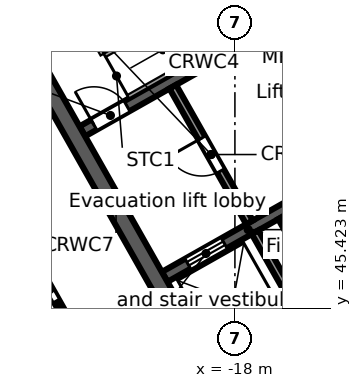
"""IFC4 building model, lengths in metres.
Left out: names, types, materials, properties, quantities, classifications, styles, units other than length and angle.
Written with IfcOpenShell. Run it as: python <this file> out.ifc"""

import sys

from ifc_helpers import new_model, si_unit, direction, frame, frame_2d, origin, place, context, subcontext, project, spatial, rectangle, extrude, element, fill, save


model = new_model("IFC4")
c1 = context("Model", 3, precision=1e-05, world=origin(), true_north=direction((0.0, 1.0)))
c2 = subcontext(c1, "Body", "Model", "MODEL_VIEW")
j1 = project(units=[si_unit("LENGTHUNIT", "METRE"), si_unit("PLANEANGLEUNIT", "RADIAN")], contexts=[c1])
p1 = place(None, origin())
s1 = spatial("IfcSite", under=j1, at=p1, CompositionType="ELEMENT")
p2 = place(p1, origin())
s2 = spatial("IfcBuilding", under=s1, at=p2, CompositionType="ELEMENT")
p3 = place(p2, frame((0.0, 0.0, 207.5)))
s3 = spatial("IfcBuildingStorey", under=s2, at=p3, CompositionType="ELEMENT", Elevation=207.5)
p4 = place(p3, frame((-0.046, 47.974, 0.0), z_axis=(0.0, 0.0, 1.0), x_axis=(-0.870356579543, -0.492421998337, 0.0)))
e1 = element("IfcWall", 1, at=p4, inside=s3, PredefinedType="STANDARD", context=c2, shape_type="SweptSolid", body=[
    extrude(rectangle(XDim=43.754, YDim=0.25, at=frame_2d((21.877, 0.0))), origin(), (0.0, 0.0, 1.0), 3.62),
])
p5 = place(p4, frame((41.061, 0.0, 0.8)))
e2 = element("IfcOpeningElement", 2, at=p5, cuts=e1, PredefinedType="OPENING", context=c2, shape_type="SweptSolid", body=[
    extrude(rectangle(XDim=2.4, YDim=2.2, at=frame_2d((1.2, 1.1))), frame((0.0, 0.135, 0.0), z_axis=(0.0, -1.0, 0.0), x_axis=(1.0, 0.0, 0.0)), (0.0, 0.0, 1.0), 0.27),
])
p6 = place(p4, frame((38.443, 0.0, 0.0)))
e3 = element("IfcOpeningElement", 3, at=p6, cuts=e1, PredefinedType="OPENING", context=c2, shape_type="SweptSolid", body=[
    extrude(rectangle(XDim=1.8, YDim=2.4, at=frame_2d((0.9, 1.2))), frame((0.0, 0.135, 0.0), z_axis=(0.0, -1.0, 0.0), x_axis=(1.0, 0.0, 0.0)), (0.0, 0.0, 1.0), 0.27),
])
p7 = place(p4, frame((35.225, 0.0, 0.8)))
e4 = element("IfcOpeningElement", 4, at=p7, cuts=e1, PredefinedType="OPENING", context=c2, shape_type="SweptSolid", body=[
    extrude(rectangle(XDim=2.4, YDim=2.2, at=frame_2d((1.2, 1.1))), frame((0.0, 0.135, 0.0), z_axis=(0.0, -1.0, 0.0), x_axis=(1.0, 0.0, 0.0)), (0.0, 0.0, 1.0), 0.27),
])
p8 = place(p4, frame((32.307, 0.0, 0.8)))
e5 = element("IfcOpeningElement", 5, at=p8, cuts=e1, PredefinedType="OPENING", context=c2, shape_type="SweptSolid", body=[
    extrude(rectangle(XDim=2.4, YDim=2.2, at=frame_2d((1.2, 1.1))), frame((0.0, 0.135, 0.0), z_axis=(0.0, -1.0, 0.0), x_axis=(1.0, 0.0, 0.0)), (0.0, 0.0, 1.0), 0.27),
])
p9 = place(p4, frame((29.688, 0.0, 0.0)))
e6 = element("IfcOpeningElement", 6, at=p9, cuts=e1, PredefinedType="OPENING", context=c2, shape_type="SweptSolid", body=[
    extrude(rectangle(XDim=1.8, YDim=2.4, at=frame_2d((0.9, 1.2))), frame((0.0, 0.135, 0.0), z_axis=(0.0, -1.0, 0.0), x_axis=(1.0, 0.0, 0.0)), (0.0, 0.0, 1.0), 0.27),
])
p10 = place(p4, frame((26.47, 0.0, 0.8)))
e7 = element("IfcOpeningElement", 7, at=p10, cuts=e1, PredefinedType="OPENING", context=c2, shape_type="SweptSolid", body=[
    extrude(rectangle(XDim=2.4, YDim=2.2, at=frame_2d((1.2, 1.1))), frame((0.0, 0.135, 0.0), z_axis=(0.0, -1.0, 0.0), x_axis=(1.0, 0.0, 0.0)), (0.0, 0.0, 1.0), 0.27),
])
p11 = place(p4, frame((23.552, 0.0, 0.8)))
e8 = element("IfcOpeningElement", 8, at=p11, cuts=e1, PredefinedType="OPENING", context=c2, shape_type="SweptSolid", body=[
    extrude(rectangle(XDim=2.4, YDim=2.2, at=frame_2d((1.2, 1.1))), frame((0.0, 0.135, 0.0), z_axis=(0.0, -1.0, 0.0), x_axis=(1.0, 0.0, 0.0)), (0.0, 0.0, 1.0), 0.27),
])
p12 = place(p4, frame((20.934, 0.0, 0.0)))
e9 = element("IfcOpeningElement", 9, at=p12, cuts=e1, PredefinedType="OPENING", context=c2, shape_type="SweptSolid", body=[
    extrude(rectangle(XDim=1.8, YDim=2.4, at=frame_2d((0.9, 1.2))), frame((0.0, 0.135, 0.0), z_axis=(0.0, -1.0, 0.0), x_axis=(1.0, 0.0, 0.0)), (0.0, 0.0, 1.0), 0.27),
])
p13 = place(p4, frame((17.716, 0.0, 0.8)))
e10 = element("IfcOpeningElement", 10, at=p13, cuts=e1, PredefinedType="OPENING", context=c2, shape_type="SweptSolid", body=[
    extrude(rectangle(XDim=2.4, YDim=2.2, at=frame_2d((1.2, 1.1))), frame((0.0, 0.135, 0.0), z_axis=(0.0, -1.0, 0.0), x_axis=(1.0, 0.0, 0.0)), (0.0, 0.0, 1.0), 0.27),
])
p14 = place(p4, frame((14.798, 0.0, 0.8)))
e11 = element("IfcOpeningElement", 11, at=p14, cuts=e1, PredefinedType="OPENING", context=c2, shape_type="SweptSolid", body=[
    extrude(rectangle(XDim=2.4, YDim=2.2, at=frame_2d((1.2, 1.1))), frame((0.0, 0.135, 0.0), z_axis=(0.0, -1.0, 0.0), x_axis=(1.0, 0.0, 0.0)), (0.0, 0.0, 1.0), 0.27),
])
p15 = place(p4, frame((12.179, 0.0, 0.0)))
e12 = element("IfcOpeningElement", 12, at=p15, cuts=e1, PredefinedType="OPENING", context=c2, shape_type="SweptSolid", body=[
    extrude(rectangle(XDim=1.8, YDim=2.4, at=frame_2d((0.9, 1.2))), frame((0.0, 0.135, 0.0), z_axis=(0.0, -1.0, 0.0), x_axis=(1.0, 0.0, 0.0)), (0.0, 0.0, 1.0), 0.27),
])
p16 = place(p4, frame((8.961, 0.0, 0.8)))
e13 = element("IfcOpeningElement", 13, at=p16, cuts=e1, PredefinedType="OPENING", context=c2, shape_type="SweptSolid", body=[
    extrude(rectangle(XDim=2.4, YDim=2.2, at=frame_2d((1.2, 1.1))), frame((0.0, 0.135, 0.0), z_axis=(0.0, -1.0, 0.0), x_axis=(1.0, 0.0, 0.0)), (0.0, 0.0, 1.0), 0.27),
])
p17 = place(p4, frame((6.043, 0.0, 0.8)))
e14 = element("IfcOpeningElement", 14, at=p17, cuts=e1, PredefinedType="OPENING", context=c2, shape_type="SweptSolid", body=[
    extrude(rectangle(XDim=2.4, YDim=2.2, at=frame_2d((1.2, 1.1))), frame((0.0, 0.135, 0.0), z_axis=(0.0, -1.0, 0.0), x_axis=(1.0, 0.0, 0.0)), (0.0, 0.0, 1.0), 0.27),
])
p18 = place(p4, frame((3.425, 0.0, 0.0)))
e15 = element("IfcOpeningElement", 15, at=p18, cuts=e1, PredefinedType="OPENING", context=c2, shape_type="SweptSolid", body=[
    extrude(rectangle(XDim=1.8, YDim=2.4, at=frame_2d((0.9, 1.2))), frame((0.0, 0.135, 0.0), z_axis=(0.0, -1.0, 0.0), x_axis=(1.0, 0.0, 0.0)), (0.0, 0.0, 1.0), 0.27),
])
p19 = place(p4, frame((0.207, 0.0, 0.8)))
e16 = element("IfcOpeningElement", 16, at=p19, cuts=e1, PredefinedType="OPENING", context=c2, shape_type="SweptSolid", body=[
    extrude(rectangle(XDim=2.4, YDim=2.2, at=frame_2d((1.2, 1.1))), frame((0.0, 0.135, 0.0), z_axis=(0.0, -1.0, 0.0), x_axis=(1.0, 0.0, 0.0)), (0.0, 0.0, 1.0), 0.27),
])
p20 = place(p3, frame((-58.732, 38.771, 0.0), z_axis=(0.0, 0.0, 1.0), x_axis=(0.870354824205, 0.492425100887, 0.0)))
e17 = element("IfcWall", 17, at=p20, inside=s3, PredefinedType="STANDARD", context=c2, shape_type="SweptSolid", body=[
    extrude(rectangle(XDim=64.006, YDim=0.25, at=frame_2d((32.003, 0.0))), origin(), (0.0, 0.0, 1.0), 3.62),
])
p21 = place(p20, frame((61.259, 0.0, 0.8)))
e18 = element("IfcOpeningElement", 18, at=p21, cuts=e17, PredefinedType="OPENING", context=c2, shape_type="SweptSolid", body=[
    extrude(rectangle(XDim=2.4, YDim=2.2, at=frame_2d((1.2, 1.1))), frame((0.0, 0.135, 0.0), z_axis=(0.0, -1.0, 0.0), x_axis=(1.0, 0.0, 0.0)), (0.0, 0.0, 1.0), 0.27),
])
p22 = place(p20, frame((58.216, 0.0, 0.8)))
e19 = element("IfcOpeningElement", 19, at=p22, cuts=e17, PredefinedType="OPENING", context=c2, shape_type="SweptSolid", body=[
    extrude(rectangle(XDim=2.4, YDim=2.2, at=frame_2d((1.2, 1.1))), frame((0.0, 0.135, 0.0), z_axis=(0.0, -1.0, 0.0), x_axis=(1.0, 0.0, 0.0)), (0.0, 0.0, 1.0), 0.27),
])
p23 = place(p20, frame((55.173, 0.0, 0.8)))
e20 = element("IfcOpeningElement", 20, at=p23, cuts=e17, PredefinedType="OPENING", context=c2, shape_type="SweptSolid", body=[
    extrude(rectangle(XDim=2.4, YDim=2.2, at=frame_2d((1.2, 1.1))), frame((0.0, 0.135, 0.0), z_axis=(0.0, -1.0, 0.0), x_axis=(1.0, 0.0, 0.0)), (0.0, 0.0, 1.0), 0.27),
])
p24 = place(p20, frame((52.129, 0.0, 0.8)))
e21 = element("IfcOpeningElement", 21, at=p24, cuts=e17, PredefinedType="OPENING", context=c2, shape_type="SweptSolid", body=[
    extrude(rectangle(XDim=2.4, YDim=2.2, at=frame_2d((1.2, 1.1))), frame((0.0, 0.135, 0.0), z_axis=(0.0, -1.0, 0.0), x_axis=(1.0, 0.0, 0.0)), (0.0, 0.0, 1.0), 0.27),
])
p25 = place(p20, frame((49.086, 0.0, 0.8)))
e22 = element("IfcOpeningElement", 22, at=p25, cuts=e17, PredefinedType="OPENING", context=c2, shape_type="SweptSolid", body=[
    extrude(rectangle(XDim=2.4, YDim=2.2, at=frame_2d((1.2, 1.1))), frame((0.0, 0.135, 0.0), z_axis=(0.0, -1.0, 0.0), x_axis=(1.0, 0.0, 0.0)), (0.0, 0.0, 1.0), 0.27),
])
p26 = place(p20, frame((46.043, 0.0, 0.8)))
e23 = element("IfcOpeningElement", 23, at=p26, cuts=e17, PredefinedType="OPENING", context=c2, shape_type="SweptSolid", body=[
    extrude(rectangle(XDim=2.4, YDim=2.2, at=frame_2d((1.2, 1.1))), frame((0.0, 0.135, 0.0), z_axis=(0.0, -1.0, 0.0), x_axis=(1.0, 0.0, 0.0)), (0.0, 0.0, 1.0), 0.27),
])
p27 = place(p20, frame((43.0, 0.0, 0.8)))
e24 = element("IfcOpeningElement", 24, at=p27, cuts=e17, PredefinedType="OPENING", context=c2, shape_type="SweptSolid", body=[
    extrude(rectangle(XDim=2.4, YDim=2.2, at=frame_2d((1.2, 1.1))), frame((0.0, 0.135, 0.0), z_axis=(0.0, -1.0, 0.0), x_axis=(1.0, 0.0, 0.0)), (0.0, 0.0, 1.0), 0.27),
])
p28 = place(p20, frame((39.956, 0.0, 0.8)))
e25 = element("IfcOpeningElement", 25, at=p28, cuts=e17, PredefinedType="OPENING", context=c2, shape_type="SweptSolid", body=[
    extrude(rectangle(XDim=2.4, YDim=2.2, at=frame_2d((1.2, 1.1))), frame((0.0, 0.135, 0.0), z_axis=(0.0, -1.0, 0.0), x_axis=(1.0, 0.0, 0.0)), (0.0, 0.0, 1.0), 0.27),
])
p29 = place(p20, frame((36.913, 0.0, 0.8)))
e26 = element("IfcOpeningElement", 26, at=p29, cuts=e17, PredefinedType="OPENING", context=c2, shape_type="SweptSolid", body=[
    extrude(rectangle(XDim=2.4, YDim=2.2, at=frame_2d((1.2, 1.1))), frame((0.0, 0.135, 0.0), z_axis=(0.0, -1.0, 0.0), x_axis=(1.0, 0.0, 0.0)), (0.0, 0.0, 1.0), 0.27),
])
p30 = place(p20, frame((33.87, 0.0, 0.8)))
e27 = element("IfcOpeningElement", 27, at=p30, cuts=e17, PredefinedType="OPENING", context=c2, shape_type="SweptSolid", body=[
    extrude(rectangle(XDim=2.4, YDim=2.2, at=frame_2d((1.2, 1.1))), frame((0.0, 0.135, 0.0), z_axis=(0.0, -1.0, 0.0), x_axis=(1.0, 0.0, 0.0)), (0.0, 0.0, 1.0), 0.27),
])
p31 = place(p20, frame((30.826, 0.0, 0.8)))
e28 = element("IfcOpeningElement", 28, at=p31, cuts=e17, PredefinedType="OPENING", context=c2, shape_type="SweptSolid", body=[
    extrude(rectangle(XDim=2.4, YDim=2.2, at=frame_2d((1.2, 1.1))), frame((0.0, 0.135, 0.0), z_axis=(0.0, -1.0, 0.0), x_axis=(1.0, 0.0, 0.0)), (0.0, 0.0, 1.0), 0.27),
])
p32 = place(p20, frame((27.783, 0.0, 0.8)))
e29 = element("IfcOpeningElement", 29, at=p32, cuts=e17, PredefinedType="OPENING", context=c2, shape_type="SweptSolid", body=[
    extrude(rectangle(XDim=2.4, YDim=2.2, at=frame_2d((1.2, 1.1))), frame((0.0, 0.135, 0.0), z_axis=(0.0, -1.0, 0.0), x_axis=(1.0, 0.0, 0.0)), (0.0, 0.0, 1.0), 0.27),
])
p33 = place(p20, frame((24.74, 0.0, 0.8)))
e30 = element("IfcOpeningElement", 30, at=p33, cuts=e17, PredefinedType="OPENING", context=c2, shape_type="SweptSolid", body=[
    extrude(rectangle(XDim=2.4, YDim=2.2, at=frame_2d((1.2, 1.1))), frame((0.0, 0.135, 0.0), z_axis=(0.0, -1.0, 0.0), x_axis=(1.0, 0.0, 0.0)), (0.0, 0.0, 1.0), 0.27),
])
p34 = place(p20, frame((21.696, 0.0, 0.8)))
e31 = element("IfcOpeningElement", 31, at=p34, cuts=e17, PredefinedType="OPENING", context=c2, shape_type="SweptSolid", body=[
    extrude(rectangle(XDim=2.4, YDim=2.2, at=frame_2d((1.2, 1.1))), frame((0.0, 0.135, 0.0), z_axis=(0.0, -1.0, 0.0), x_axis=(1.0, 0.0, 0.0)), (0.0, 0.0, 1.0), 0.27),
])
p35 = place(p20, frame((18.653, 0.0, 0.8)))
e32 = element("IfcOpeningElement", 32, at=p35, cuts=e17, PredefinedType="OPENING", context=c2, shape_type="SweptSolid", body=[
    extrude(rectangle(XDim=2.4, YDim=2.2, at=frame_2d((1.2, 1.1))), frame((0.0, 0.135, 0.0), z_axis=(0.0, -1.0, 0.0), x_axis=(1.0, 0.0, 0.0)), (0.0, 0.0, 1.0), 0.27),
])
p36 = place(p20, frame((15.61, 0.0, 0.8)))
e33 = element("IfcOpeningElement", 33, at=p36, cuts=e17, PredefinedType="OPENING", context=c2, shape_type="SweptSolid", body=[
    extrude(rectangle(XDim=2.4, YDim=2.2, at=frame_2d((1.2, 1.1))), frame((0.0, 0.135, 0.0), z_axis=(0.0, -1.0, 0.0), x_axis=(1.0, 0.0, 0.0)), (0.0, 0.0, 1.0), 0.27),
])
p37 = place(p20, frame((12.567, 0.0, 0.8)))
e34 = element("IfcOpeningElement", 34, at=p37, cuts=e17, PredefinedType="OPENING", context=c2, shape_type="SweptSolid", body=[
    extrude(rectangle(XDim=2.4, YDim=2.2, at=frame_2d((1.2, 1.1))), frame((0.0, 0.135, 0.0), z_axis=(0.0, -1.0, 0.0), x_axis=(1.0, 0.0, 0.0)), (0.0, 0.0, 1.0), 0.27),
])
p38 = place(p20, frame((9.523, 0.0, 0.8)))
e35 = element("IfcOpeningElement", 35, at=p38, cuts=e17, PredefinedType="OPENING", context=c2, shape_type="SweptSolid", body=[
    extrude(rectangle(XDim=2.4, YDim=2.2, at=frame_2d((1.2, 1.1))), frame((0.0, 0.135, 0.0), z_axis=(0.0, -1.0, 0.0), x_axis=(1.0, 0.0, 0.0)), (0.0, 0.0, 1.0), 0.27),
])
p39 = place(p20, frame((6.48, 0.0, 0.8)))
e36 = element("IfcOpeningElement", 36, at=p39, cuts=e17, PredefinedType="OPENING", context=c2, shape_type="SweptSolid", body=[
    extrude(rectangle(XDim=2.4, YDim=2.2, at=frame_2d((1.2, 1.1))), frame((0.0, 0.135, 0.0), z_axis=(0.0, -1.0, 0.0), x_axis=(1.0, 0.0, 0.0)), (0.0, 0.0, 1.0), 0.27),
])
p40 = place(p20, frame((3.437, 0.0, 0.8)))
e37 = element("IfcOpeningElement", 37, at=p40, cuts=e17, PredefinedType="OPENING", context=c2, shape_type="SweptSolid", body=[
    extrude(rectangle(XDim=2.4, YDim=2.2, at=frame_2d((1.2, 1.1))), frame((0.0, 0.135, 0.0), z_axis=(0.0, -1.0, 0.0), x_axis=(1.0, 0.0, 0.0)), (0.0, 0.0, 1.0), 0.27),
])
p41 = place(p20, frame((0.393, 0.0, 0.8)))
e38 = element("IfcOpeningElement", 38, at=p41, cuts=e17, PredefinedType="OPENING", context=c2, shape_type="SweptSolid", body=[
    extrude(rectangle(XDim=2.4, YDim=2.2, at=frame_2d((1.2, 1.1))), frame((0.0, 0.135, 0.0), z_axis=(0.0, -1.0, 0.0), x_axis=(1.0, 0.0, 0.0)), (0.0, 0.0, 1.0), 0.27),
])
p42 = place(p3, frame((-17.988, 42.039, 0.0), z_axis=(0.0, 0.0, 1.0), x_axis=(0.870360574057, 0.492414937962, 0.0)))
e39 = element("IfcWall", 39, at=p42, inside=s3, PredefinedType="SOLIDWALL", context=c2, shape_type="SweptSolid", body=[
    extrude(rectangle(XDim=15.0, YDim=0.45, at=frame_2d((7.5, 0.0))), origin(), (0.0, 0.0, 1.0), 3.62),
])
p43 = place(p42, frame((6.1, 0.0, 0.0)))
e40 = element("IfcOpeningElement", 40, at=p43, cuts=e39, PredefinedType="OPENING", context=c2, shape_type="SweptSolid", body=[
    extrude(rectangle(XDim=1.2, YDim=2.1, at=frame_2d((0.6, 1.05))), frame((0.0, 0.235, 0.0), z_axis=(0.0, -1.0, 0.0), x_axis=(1.0, 0.0, 0.0)), (0.0, 0.0, 1.0), 0.47),
])
p44 = place(p3, frame((-19.849, 46.242, 0.0), z_axis=(0.0, 0.0, 1.0), x_axis=(0.870347559728, 0.492437940532, 0.0)))
e41 = element("IfcWall", 41, at=p44, inside=s3, PredefinedType="SOLIDWALL", context=c2, shape_type="SweptSolid", body=[
    extrude(rectangle(XDim=5.05, YDim=0.3, at=frame_2d((2.525, 0.0))), origin(), (0.0, 0.0, 1.0), 3.62),
])
p45 = place(p44, frame((0.7, 0.0, 0.0)))
e42 = element("IfcOpeningElement", 42, at=p45, cuts=e41, PredefinedType="OPENING", context=c2, shape_type="SweptSolid", body=[
    extrude(rectangle(XDim=1.1, YDim=2.1, at=frame_2d((0.55, 1.05))), frame((0.0, 0.16, 0.0), z_axis=(0.0, -1.0, 0.0), x_axis=(1.0, 0.0, 0.0)), (0.0, 0.0, 1.0), 0.32),
])
p46 = place(p44, frame((3.8, 0.0, 0.0)))
e43 = element("IfcOpeningElement", 43, at=p46, cuts=e41, PredefinedType="OPENING", context=c2, shape_type="SweptSolid", body=[
    extrude(rectangle(XDim=0.9, YDim=2.1, at=frame_2d((0.45, 1.05))), frame((0.0, 0.16, 0.0), z_axis=(0.0, -1.0, 0.0), x_axis=(1.0, 0.0, 0.0)), (0.0, 0.0, 1.0), 0.32),
])
p47 = place(p3, frame((-22.015, 50.072, 0.0), z_axis=(0.0, 0.0, 1.0), x_axis=(0.870354900257, 0.492424966466, 0.0)))
e44 = element("IfcWall", 44, at=p47, inside=s3, PredefinedType="SOLIDWALL", context=c2, shape_type="SweptSolid", body=[
    extrude(rectangle(XDim=7.35, YDim=0.3, at=frame_2d((3.675, 0.0))), origin(), (0.0, 0.0, 1.0), 3.62),
])
p48 = place(p47, frame((0.35, 0.0, 0.0)))
e45 = element("IfcOpeningElement", 45, at=p48, cuts=e44, PredefinedType="OPENING", context=c2, shape_type="SweptSolid", body=[
    extrude(rectangle(XDim=1.0, YDim=2.1, at=frame_2d((0.5, 1.05))), frame((0.0, 0.16, 0.0), z_axis=(0.0, -1.0, 0.0), x_axis=(1.0, 0.0, 0.0)), (0.0, 0.0, 1.0), 0.32),
])
p49 = place(p3, frame((-24.353, 53.747, 0.0), z_axis=(0.0, 0.0, 1.0), x_axis=(0.492435496286, -0.870348942665, 0.0)))
e46 = element("IfcWall", 46, at=p49, inside=s3, PredefinedType="SOLIDWALL", context=c2, shape_type="SweptSolid", body=[
    extrude(rectangle(XDim=13.1, YDim=0.45, at=frame_2d((6.55, 0.0))), origin(), (0.0, 0.0, 1.0), 3.62),
])
p50 = place(p3, frame((-17.469, 47.417, 0.0), z_axis=(0.0, 0.0, 1.0), x_axis=(0.492453686477, -0.870338650569, 0.0)))
e47 = element("IfcWall", 47, at=p50, inside=s3, PredefinedType="SOLIDWALL", context=c2, shape_type="SweptSolid", body=[
    extrude(rectangle(XDim=4.2, YDim=0.2, at=frame_2d((2.1, 0.0))), origin(), (0.0, 0.0, 1.0), 3.62),
])
p51 = place(p3, frame((-19.635, 51.246, 0.0), z_axis=(0.0, 0.0, 1.0), x_axis=(0.492408451753, -0.87036424366, 0.0)))
e48 = element("IfcWall", 48, at=p51, inside=s3, PredefinedType="PARTITIONING", context=c2, shape_type="SweptSolid", body=[
    extrude(rectangle(XDim=4.1, YDim=0.2, at=frame_2d((2.05, 0.0))), origin(), (0.0, 0.0, 1.0), 3.62),
])
p52 = place(p51, frame((1.55, 0.0, 0.0)))
e49 = element("IfcOpeningElement", 49, at=p52, cuts=e48, PredefinedType="OPENING", context=c2, shape_type="SweptSolid", body=[
    extrude(rectangle(XDim=1.0, YDim=2.1, at=frame_2d((0.5, 1.05))), frame((0.0, 0.11, 0.0), z_axis=(0.0, -1.0, 0.0), x_axis=(1.0, 0.0, 0.0)), (0.0, 0.0, 1.0), 0.22),
])
p53 = place(p3, frame((-16.772, 47.811, 0.0), z_axis=(0.0, 0.0, 1.0), x_axis=(0.492453686477, -0.870338650569, 0.0)))
e50 = element("IfcWall", 50, at=p53, inside=s3, PredefinedType="SOLIDWALL", context=c2, shape_type="SweptSolid", body=[
    extrude(rectangle(XDim=4.2, YDim=0.2, at=frame_2d((2.1, 0.0))), origin(), (0.0, 0.0, 1.0), 3.62),
])
p54 = place(p3, frame((-23.361, 46.783, 0.0), z_axis=(0.0, 0.0, 1.0), x_axis=(0.492467412326, -0.870330884088, 0.0)))
e51 = element("IfcWall", 51, at=p54, inside=s3, PredefinedType="PARTITIONING", context=c2, shape_type="SweptSolid", body=[
    extrude(rectangle(XDim=2.0, YDim=0.15, at=frame_2d((1.0, 0.0))), origin(), (0.0, 0.0, 1.0), 2.892),
])
p55 = place(p54, frame((0.45, 0.0, 0.0)))
e52 = element("IfcOpeningElement", 52, at=p55, cuts=e51, PredefinedType="OPENING", context=c2, shape_type="SweptSolid", body=[
    extrude(rectangle(XDim=0.9, YDim=2.1, at=frame_2d((0.45, 1.05))), frame((0.0, 0.085, 0.0), z_axis=(0.0, -1.0, 0.0), x_axis=(1.0, 0.0, 0.0)), (0.0, 0.0, 1.0), 0.17),
])
p56 = place(p45, origin())
e53 = element("IfcDoor", 53, at=p56, inside=s3, OperationType="DOUBLE_DOOR_SLIDING", PredefinedType="DOOR", context=c2, shape_type="SweptSolid", body=[
    extrude(rectangle(XDim=1.1, YDim=2.1, at=frame_2d((0.55, 1.05))), frame((0.0, 0.025, 0.0), z_axis=(0.0, -1.0, 0.0), x_axis=(1.0, 0.0, 0.0)), (0.0, 0.0, 1.0), 0.05),
])
fill(e42, e53)
p57 = place(p48, origin())
e54 = element("IfcDoor", 54, at=p57, inside=s3, OperationType="SINGLE_SWING_LEFT", PredefinedType="DOOR", context=c2, shape_type="SweptSolid", body=[
    extrude(rectangle(XDim=1.0, YDim=2.1, at=frame_2d((0.5, 1.05))), frame((0.0, 0.025, 0.0), z_axis=(0.0, -1.0, 0.0), x_axis=(1.0, 0.0, 0.0)), (0.0, 0.0, 1.0), 0.05),
])
fill(e45, e54)
p58 = place(p52, frame((1.0, 0.0, 0.0), z_axis=(0.0, 0.0, 1.0), x_axis=(-1.0, 0.0, 0.0)))
e55 = element("IfcDoor", 55, at=p58, inside=s3, OperationType="SINGLE_SWING_RIGHT", PredefinedType="DOOR", context=c2, shape_type="SweptSolid", body=[
    extrude(rectangle(XDim=1.0, YDim=2.1, at=frame_2d((0.5, 1.05))), frame((0.0, 0.025, 0.0), z_axis=(0.0, -1.0, 0.0), x_axis=(1.0, 0.0, 0.0)), (0.0, 0.0, 1.0), 0.05),
])
fill(e49, e55)
p59 = place(p55, frame((0.9, 0.0, 0.0), z_axis=(0.0, 0.0, 1.0), x_axis=(-1.0, 0.0, 0.0)))
e56 = element("IfcDoor", 56, at=p59, inside=s3, OperationType="SINGLE_SWING_RIGHT", PredefinedType="DOOR", context=c2, shape_type="SweptSolid", body=[
    extrude(rectangle(XDim=0.9, YDim=2.1, at=frame_2d((0.45, 1.05))), frame((0.0, 0.025, 0.0), z_axis=(0.0, -1.0, 0.0), x_axis=(1.0, 0.0, 0.0)), (0.0, 0.0, 1.0), 0.05),
])
fill(e52, e56)
save(model, sys.argv[1])
